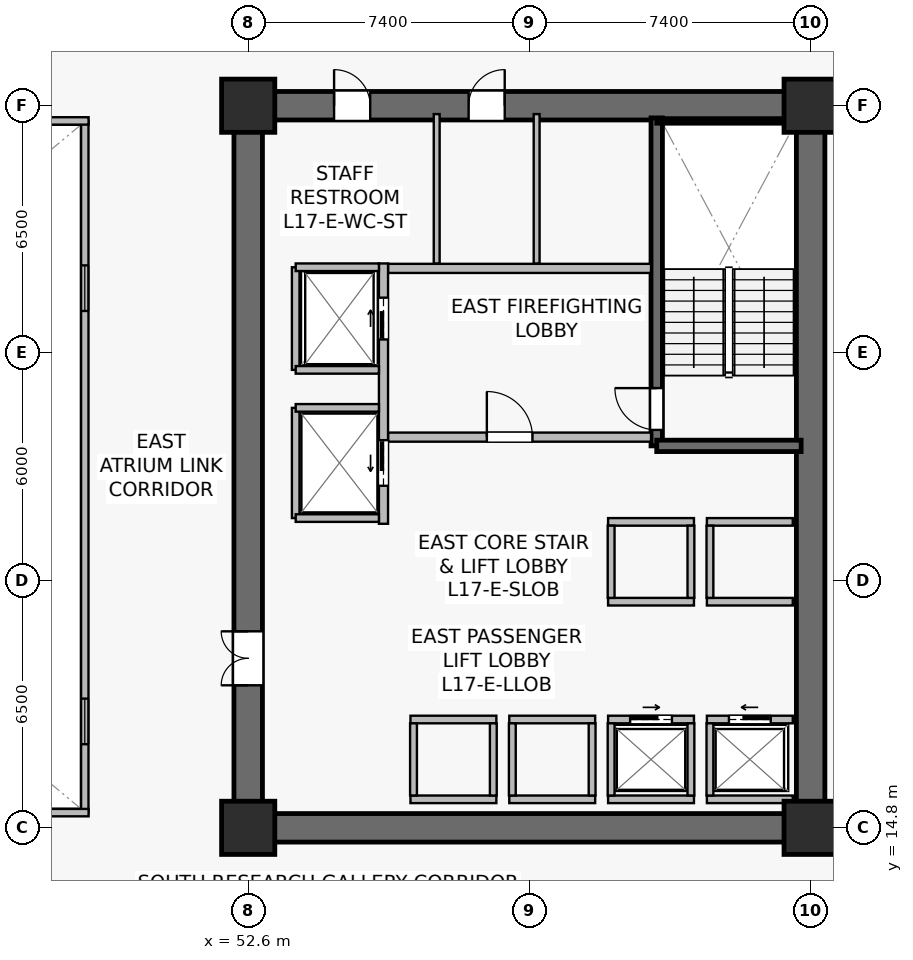
"""IFC4 building model, lengths in metres.
Left out: names, types, materials, properties, quantities, classifications, styles, units other than length and angle.
Written with IfcOpenShell. Run it as: python <this file> out.ifc"""

import sys

from ifc_helpers import new_model, si_unit, direction, frame, frame_2d, origin, origin_2d, place, context, subcontext, project, spatial, rectangle, extrude, source, transform, mapped, element, fill, save


model = new_model("IFC4")
c1 = context("Model", 3, precision=1e-05, world=origin(), true_north=direction((0.0, 1.0)))
c2 = subcontext(c1, "Body", "Model", "MODEL_VIEW")
j1 = project(units=[si_unit("LENGTHUNIT", "METRE"), si_unit("PLANEANGLEUNIT", "RADIAN")], contexts=[c1])
p1 = place(None, origin())
s1 = spatial("IfcSite", under=j1, at=p1, CompositionType="ELEMENT")
p2 = place(p1, origin())
s2 = spatial("IfcBuilding", under=s1, at=p2, CompositionType="ELEMENT")
p3 = place(p2, frame((0.0, 0.0, 70.3)))
s3 = spatial("IfcBuildingStorey", under=s2, at=p3, CompositionType="ELEMENT", Elevation=70.3)
p4 = place(p3, frame((52.225, 14.8, 0.0), z_axis=(0.0, 0.0, 1.0), x_axis=(1.0, 0.0, 0.0)))
e1 = element("IfcWall", 1, at=p4, inside=s3, PredefinedType="SHEAR", context=c2, shape_type="SweptSolid", body=[
    extrude(rectangle(XDim=15.55, YDim=0.75, at=frame_2d((7.775, 0.0))), origin(), (0.0, 0.0, 1.0), 3.78),
])
p5 = place(p3, frame((52.225, 33.8, 0.0), z_axis=(0.0, 0.0, 1.0), x_axis=(1.0, 0.0, 0.0)))
e2 = element("IfcWall", 2, at=p5, inside=s3, PredefinedType="SHEAR", context=c2, shape_type="SweptSolid", body=[
    extrude(rectangle(XDim=15.55, YDim=0.75, at=frame_2d((7.775, 0.0))), origin(), (0.0, 0.0, 1.0), 3.78),
])
p6 = place(p5, frame((6.175, 0.0, 0.0)))
e3 = element("IfcOpeningElement", 3, at=p6, cuts=e2, PredefinedType="OPENING", context=c2, shape_type="SweptSolid", body=[
    extrude(rectangle(XDim=0.95, YDim=2.15, at=frame_2d((0.475, 1.075))), frame((0.0, 0.385, 0.0), z_axis=(0.0, -1.0, 0.0), x_axis=(1.0, 0.0, 0.0)), (0.0, 0.0, 1.0), 0.77),
])
p7 = place(p5, frame((2.635, 0.0, 0.0)))
e4 = element("IfcOpeningElement", 4, at=p7, cuts=e2, PredefinedType="OPENING", context=c2, shape_type="SweptSolid", body=[
    extrude(rectangle(XDim=0.95, YDim=2.15, at=frame_2d((0.475, 1.075))), frame((0.0, 0.385, 0.0), z_axis=(0.0, -1.0, 0.0), x_axis=(1.0, 0.0, 0.0)), (0.0, 0.0, 1.0), 0.77),
])
p8 = place(p3, frame((52.6, 15.175, 0.0), z_axis=(0.0, 0.0, 1.0), x_axis=(0.0, 1.0, 0.0)))
e5 = element("IfcWall", 5, at=p8, inside=s3, PredefinedType="SHEAR", context=c2, shape_type="SweptSolid", body=[
    extrude(rectangle(XDim=18.25, YDim=0.75, at=frame_2d((9.125, 0.0))), origin(), (0.0, 0.0, 1.0), 3.78),
])
p9 = place(p8, frame((3.375, 0.0, 0.0)))
e6 = element("IfcOpeningElement", 6, at=p9, cuts=e5, PredefinedType="OPENING", context=c2, shape_type="SweptSolid", body=[
    extrude(rectangle(XDim=1.42, YDim=2.2, at=frame_2d((0.71, 1.1))), frame((0.0, 0.385, 0.0), z_axis=(0.0, -1.0, 0.0), x_axis=(1.0, 0.0, 0.0)), (0.0, 0.0, 1.0), 0.77),
])
p10 = place(p3, frame((67.4, 15.175, 0.0), z_axis=(0.0, 0.0, 1.0), x_axis=(0.0, 1.0, 0.0)))
e7 = element("IfcWall", 7, at=p10, inside=s3, PredefinedType="SHEAR", context=c2, shape_type="SweptSolid", body=[
    extrude(rectangle(XDim=18.25, YDim=0.75, at=frame_2d((9.125, 0.0))), origin(), (0.0, 0.0, 1.0), 3.78),
])
p11 = place(p3, frame((63.35, 24.85, 0.0), z_axis=(0.0, 0.0, 1.0), x_axis=(0.0, 1.0, 0.0)))
e8 = element("IfcWall", 8, at=p11, inside=s3, PredefinedType="SHEAR", context=c2, shape_type="SweptSolid", body=[
    extrude(rectangle(XDim=8.63, YDim=0.3, at=frame_2d((4.315, 0.0))), origin(), (0.0, 0.0, 1.0), 3.78),
])
p12 = place(p11, frame((0.42, 0.0, 0.0)))
e9 = element("IfcOpeningElement", 9, at=p12, cuts=e8, PredefinedType="OPENING", context=c2, shape_type="SweptSolid", body=[
    extrude(rectangle(XDim=1.1, YDim=2.15, at=frame_2d((0.55, 1.075))), frame((0.0, 0.16, 0.0), z_axis=(0.0, -1.0, 0.0), x_axis=(1.0, 0.0, 0.0)), (0.0, 0.0, 1.0), 0.32),
])
p13 = place(p3, frame((63.35, 24.85, 0.0), z_axis=(0.0, 0.0, 1.0), x_axis=(1.0, 0.0, 0.0)))
e10 = element("IfcWall", 10, at=p13, inside=s3, PredefinedType="SHEAR", context=c2, shape_type="SweptSolid", body=[
    extrude(rectangle(XDim=3.8, YDim=0.3, at=frame_2d((1.9, 0.0))), origin(), (0.0, 0.0, 1.0), 3.78),
])
p14 = place(p3, frame((63.35, 33.4, 0.0), z_axis=(0.0, 0.0, 1.0), x_axis=(1.0, 0.0, 0.0)))
e11 = element("IfcWall", 11, at=p14, inside=s3, PredefinedType="SOLIDWALL", context=c2, shape_type="SweptSolid", body=[
    extrude(rectangle(XDim=3.72, YDim=0.12, at=frame_2d((1.86, 0.0))), origin(), (0.0, 0.0, 1.0), 3.78),
])
m1 = source(origin(), c2, "Body", "SweptSolid", [
    extrude(rectangle(XDim=1.4, YDim=1.4, at=origin_2d()), origin(), (0.0, 0.0, 1.0), 4.1),
])
for number, where, z_axis, x_axis in (
    (12, (52.6, 14.8, 0.0), (0.0, 0.0, 1.0), (1.0, 0.0, 0.0)),
    (13, (67.4, 14.8, 0.0), (0.0, 0.0, 1.0), (1.0, 0.0, 0.0)),
    (14, (52.6, 33.8, 0.0), (0.0, 0.0, 1.0), (1.0, 0.0, 0.0)),
    (15, (67.4, 33.8, 0.0), (0.0, 0.0, 1.0), (1.0, 0.0, 0.0)),
):
    element("IfcColumn", number, at=place(p3, frame(where, z_axis=z_axis, x_axis=x_axis)), inside=s3, PredefinedType="COLUMN", context=c2, shape_type="MappedRepresentation", body=[
        mapped(m1, transform((0.0, 0.0, 0.0), scale=1.0)),
    ])
p15 = place(p3, frame((56.28, 25.08, 0.0), z_axis=(0.0, 0.0, 1.0), x_axis=(1.0, 0.0, 0.0)))
e16 = element("IfcWall", 16, at=p15, inside=s3, PredefinedType="SOLIDWALL", context=c2, shape_type="SweptSolid", body=[
    extrude(rectangle(XDim=6.92, YDim=0.24, at=frame_2d((3.46, 0.0))), origin(), (0.0, 0.0, 1.0), 3.115),
])
p16 = place(p15, frame((2.6, 0.0, 0.0)))
e17 = element("IfcOpeningElement", 17, at=p16, cuts=e16, PredefinedType="OPENING", context=c2, shape_type="SweptSolid", body=[
    extrude(rectangle(XDim=1.2, YDim=2.16, at=frame_2d((0.6, 1.08))), frame((0.0, 0.13, 0.0), z_axis=(0.0, -1.0, 0.0), x_axis=(1.0, 0.0, 0.0)), (0.0, 0.0, 1.0), 0.26),
])
p17 = place(p3, frame((56.28, 29.52, 0.0), z_axis=(0.0, 0.0, 1.0), x_axis=(1.0, 0.0, 0.0)))
e18 = element("IfcWall", 18, at=p17, inside=s3, PredefinedType="SOLIDWALL", context=c2, shape_type="SweptSolid", body=[
    extrude(rectangle(XDim=6.92, YDim=0.24, at=frame_2d((3.46, 0.0))), origin(), (0.0, 0.0, 1.0), 3.115),
])
p18 = place(p3, frame((56.16, 22.8, 0.0), z_axis=(0.0, 0.0, 1.0), x_axis=(0.0, 1.0, 0.0)))
e19 = element("IfcWall", 19, at=p18, inside=s3, PredefinedType="SOLIDWALL", context=c2, shape_type="SweptSolid", body=[
    extrude(rectangle(XDim=6.85, YDim=0.24, at=frame_2d((3.425, 0.0))), origin(), (0.0, 0.0, 1.0), 2.865),
])
p19 = place(p18, frame((4.85, 0.0, 0.0)))
e20 = element("IfcOpeningElement", 20, at=p19, cuts=e19, PredefinedType="OPENING", context=c2, shape_type="SweptSolid", body=[
    extrude(rectangle(XDim=1.1, YDim=2.22, at=frame_2d((0.55, 1.11))), frame((0.0, 0.13, 0.0), z_axis=(0.0, -1.0, 0.0), x_axis=(1.0, 0.0, 0.0)), (0.0, 0.0, 1.0), 0.26),
])
p20 = place(p18, frame((1.0, 0.0, 0.0)))
e21 = element("IfcOpeningElement", 21, at=p20, cuts=e19, PredefinedType="OPENING", context=c2, shape_type="SweptSolid", body=[
    extrude(rectangle(XDim=1.2, YDim=2.22, at=frame_2d((0.6, 1.11))), frame((0.0, 0.13, 0.0), z_axis=(0.0, -1.0, 0.0), x_axis=(1.0, 0.0, 0.0)), (0.0, 0.0, 1.0), 0.26),
])
p21 = place(p3, frame((64.67, 17.65, 0.0), z_axis=(0.0, 0.0, 1.0), x_axis=(1.0, 0.0, 0.0)))
e22 = element("IfcWall", 22, at=p21, inside=s3, PredefinedType="SOLIDWALL", context=c2, shape_type="SweptSolid", body=[
    extrude(rectangle(XDim=2.26, YDim=0.2, at=frame_2d((1.13, 0.0))), origin(), (0.0, 0.0, 1.0), 3.78),
])
p22 = place(p21, frame((0.58, 0.0, 0.0)))
e23 = element("IfcOpeningElement", 23, at=p22, cuts=e22, PredefinedType="OPENING", context=c2, shape_type="SweptSolid", body=[
    extrude(rectangle(XDim=1.1, YDim=2.22, at=frame_2d((0.55, 1.11))), frame((0.0, 0.11, 0.0), z_axis=(0.0, -1.0, 0.0), x_axis=(1.0, 0.0, 0.0)), (0.0, 0.0, 1.0), 0.22),
])
p23 = place(p3, frame((64.67, 15.55, 0.0), z_axis=(0.0, 0.0, 1.0), x_axis=(1.0, 0.0, 0.0)))
e24 = element("IfcWall", 24, at=p23, inside=s3, PredefinedType="SOLIDWALL", context=c2, shape_type="SweptSolid", body=[
    extrude(rectangle(XDim=2.26, YDim=0.2, at=frame_2d((1.13, 0.0))), origin(), (0.0, 0.0, 1.0), 3.78),
])
p24 = place(p3, frame((64.75, 15.65, 0.0), z_axis=(0.0, 0.0, 1.0), x_axis=(0.0, 1.0, 0.0)))
e25 = element("IfcWall", 25, at=p24, inside=s3, PredefinedType="SOLIDWALL", context=c2, shape_type="SweptSolid", body=[
    extrude(rectangle(XDim=1.9, YDim=0.18, at=frame_2d((0.95, 0.0))), origin(), (0.0, 0.0, 1.0), 3.78),
])
p25 = place(p3, frame((62.07, 17.65, 0.0), z_axis=(0.0, 0.0, 1.0), x_axis=(1.0, 0.0, 0.0)))
e26 = element("IfcWall", 26, at=p25, inside=s3, PredefinedType="SOLIDWALL", context=c2, shape_type="SweptSolid", body=[
    extrude(rectangle(XDim=2.26, YDim=0.2, at=frame_2d((1.13, 0.0))), origin(), (0.0, 0.0, 1.0), 3.78),
])
p26 = place(p25, frame((0.58, 0.0, 0.0)))
e27 = element("IfcOpeningElement", 27, at=p26, cuts=e26, PredefinedType="OPENING", context=c2, shape_type="SweptSolid", body=[
    extrude(rectangle(XDim=1.1, YDim=2.22, at=frame_2d((0.55, 1.11))), frame((0.0, 0.11, 0.0), z_axis=(0.0, -1.0, 0.0), x_axis=(1.0, 0.0, 0.0)), (0.0, 0.0, 1.0), 0.22),
])
p27 = place(p3, frame((62.07, 15.55, 0.0), z_axis=(0.0, 0.0, 1.0), x_axis=(1.0, 0.0, 0.0)))
e28 = element("IfcWall", 28, at=p27, inside=s3, PredefinedType="SOLIDWALL", context=c2, shape_type="SweptSolid", body=[
    extrude(rectangle(XDim=2.26, YDim=0.2, at=frame_2d((1.13, 0.0))), origin(), (0.0, 0.0, 1.0), 3.78),
])
for number, where, z_axis, x_axis in (
    (29, (62.15, 15.65, 0.0), (0.0, 0.0, 1.0), (0.0, 1.0, 0.0)),
    (30, (64.25, 15.65, 0.0), (0.0, 0.0, 1.0), (0.0, 1.0, 0.0)),
):
    element("IfcWall", number, at=place(p3, frame(where, z_axis=z_axis, x_axis=x_axis)), inside=s3, PredefinedType="SOLIDWALL", context=c2, shape_type="SweptSolid", body=[
        extrude(rectangle(XDim=1.9, YDim=0.18, at=frame_2d((0.95, 0.0))), origin(), (0.0, 0.0, 1.0), 3.78),
    ])
for number, where, z_axis, x_axis in (
    (31, (59.47, 17.65, 0.0), (0.0, 0.0, 1.0), (1.0, 0.0, 0.0)),
    (32, (59.47, 15.55, 0.0), (0.0, 0.0, 1.0), (1.0, 0.0, 0.0)),
):
    element("IfcWall", number, at=place(p3, frame(where, z_axis=z_axis, x_axis=x_axis)), inside=s3, PredefinedType="SOLIDWALL", context=c2, shape_type="SweptSolid", body=[
        extrude(rectangle(XDim=2.26, YDim=0.2, at=frame_2d((1.13, 0.0))), origin(), (0.0, 0.0, 1.0), 3.115),
    ])
for number, where, z_axis, x_axis in (
    (33, (59.55, 15.65, 0.0), (0.0, 0.0, 1.0), (0.0, 1.0, 0.0)),
    (34, (61.65, 15.65, 0.0), (0.0, 0.0, 1.0), (0.0, 1.0, 0.0)),
):
    element("IfcWall", number, at=place(p3, frame(where, z_axis=z_axis, x_axis=x_axis)), inside=s3, PredefinedType="SOLIDWALL", context=c2, shape_type="SweptSolid", body=[
        extrude(rectangle(XDim=1.9, YDim=0.18, at=frame_2d((0.95, 0.0))), origin(), (0.0, 0.0, 1.0), 3.78),
    ])
for number, where, z_axis, x_axis in (
    (35, (56.87, 17.65, 0.0), (0.0, 0.0, 1.0), (1.0, 0.0, 0.0)),
    (36, (56.87, 15.55, 0.0), (0.0, 0.0, 1.0), (1.0, 0.0, 0.0)),
):
    element("IfcWall", number, at=place(p3, frame(where, z_axis=z_axis, x_axis=x_axis)), inside=s3, PredefinedType="SOLIDWALL", context=c2, shape_type="SweptSolid", body=[
        extrude(rectangle(XDim=2.26, YDim=0.2, at=frame_2d((1.13, 0.0))), origin(), (0.0, 0.0, 1.0), 3.78),
    ])
for number, where, z_axis, x_axis in (
    (37, (56.95, 15.65, 0.0), (0.0, 0.0, 1.0), (0.0, 1.0, 0.0)),
    (38, (59.05, 15.65, 0.0), (0.0, 0.0, 1.0), (0.0, 1.0, 0.0)),
):
    element("IfcWall", number, at=place(p3, frame(where, z_axis=z_axis, x_axis=x_axis)), inside=s3, PredefinedType="SOLIDWALL", context=c2, shape_type="SweptSolid", body=[
        extrude(rectangle(XDim=1.9, YDim=0.18, at=frame_2d((0.95, 0.0))), origin(), (0.0, 0.0, 1.0), 3.78),
    ])
for number, where, z_axis, x_axis in (
    (39, (64.67, 20.75, 0.0), (0.0, 0.0, 1.0), (1.0, 0.0, 0.0)),
    (40, (64.67, 22.85, 0.0), (0.0, 0.0, 1.0), (1.0, 0.0, 0.0)),
):
    element("IfcWall", number, at=place(p3, frame(where, z_axis=z_axis, x_axis=x_axis)), inside=s3, PredefinedType="SOLIDWALL", context=c2, shape_type="SweptSolid", body=[
        extrude(rectangle(XDim=2.26, YDim=0.2, at=frame_2d((1.13, 0.0))), origin(), (0.0, 0.0, 1.0), 3.78),
    ])
p28 = place(p3, frame((64.75, 20.85, 0.0), z_axis=(0.0, 0.0, 1.0), x_axis=(0.0, 1.0, 0.0)))
e41 = element("IfcWall", 41, at=p28, inside=s3, PredefinedType="SOLIDWALL", context=c2, shape_type="SweptSolid", body=[
    extrude(rectangle(XDim=1.9, YDim=0.18, at=frame_2d((0.95, 0.0))), origin(), (0.0, 0.0, 1.0), 3.78),
])
for number, where, z_axis, x_axis in (
    (42, (62.07, 20.75, 0.0), (0.0, 0.0, 1.0), (1.0, 0.0, 0.0)),
    (43, (62.07, 22.85, 0.0), (0.0, 0.0, 1.0), (1.0, 0.0, 0.0)),
):
    element("IfcWall", number, at=place(p3, frame(where, z_axis=z_axis, x_axis=x_axis)), inside=s3, PredefinedType="SOLIDWALL", context=c2, shape_type="SweptSolid", body=[
        extrude(rectangle(XDim=2.26, YDim=0.2, at=frame_2d((1.13, 0.0))), origin(), (0.0, 0.0, 1.0), 3.78),
    ])
for number, where, z_axis, x_axis in (
    (44, (62.15, 20.85, 0.0), (0.0, 0.0, 1.0), (0.0, 1.0, 0.0)),
    (45, (64.25, 20.85, 0.0), (0.0, 0.0, 1.0), (0.0, 1.0, 0.0)),
):
    element("IfcWall", number, at=place(p3, frame(where, z_axis=z_axis, x_axis=x_axis)), inside=s3, PredefinedType="SOLIDWALL", context=c2, shape_type="SweptSolid", body=[
        extrude(rectangle(XDim=1.9, YDim=0.18, at=frame_2d((0.95, 0.0))), origin(), (0.0, 0.0, 1.0), 3.78),
    ])
p29 = place(p3, frame((53.85, 26.85, 0.0), z_axis=(0.0, 0.0, 1.0), x_axis=(0.0, 1.0, 0.0)))
e46 = element("IfcWall", 46, at=p29, inside=s3, PredefinedType="SOLIDWALL", context=c2, shape_type="SweptSolid", body=[
    extrude(rectangle(XDim=2.7, YDim=0.2, at=frame_2d((1.35, 0.0))), origin(), (0.0, 0.0, 1.0), 3.78),
])
p30 = place(p3, frame((53.85, 29.55, 0.0), z_axis=(0.0, 0.0, 1.0), x_axis=(1.0, 0.0, 0.0)))
e47 = element("IfcWall", 47, at=p30, inside=s3, PredefinedType="SOLIDWALL", context=c2, shape_type="SweptSolid", body=[
    extrude(rectangle(XDim=2.19, YDim=0.2, at=frame_2d((1.095, 0.0))), origin(), (0.0, 0.0, 1.0), 3.78),
])
p31 = place(p3, frame((53.85, 26.85, 0.0), z_axis=(0.0, 0.0, 1.0), x_axis=(1.0, 0.0, 0.0)))
e48 = element("IfcWall", 48, at=p31, inside=s3, PredefinedType="SOLIDWALL", context=c2, shape_type="SweptSolid", body=[
    extrude(rectangle(XDim=2.19, YDim=0.2, at=frame_2d((1.095, 0.0))), origin(), (0.0, 0.0, 1.0), 3.177),
])
p32 = place(p3, frame((53.85, 22.95, 0.0), z_axis=(0.0, 0.0, 1.0), x_axis=(0.0, 1.0, 0.0)))
e49 = element("IfcWall", 49, at=p32, inside=s3, PredefinedType="SOLIDWALL", context=c2, shape_type="SweptSolid", body=[
    extrude(rectangle(XDim=2.9, YDim=0.2, at=frame_2d((1.45, 0.0))), origin(), (0.0, 0.0, 1.0), 2.865),
])
for number, where, z_axis, x_axis in (
    (50, (53.85, 25.85, 0.0), (0.0, 0.0, 1.0), (1.0, 0.0, 0.0)),
    (51, (53.85, 22.95, 0.0), (0.0, 0.0, 1.0), (1.0, 0.0, 0.0)),
):
    element("IfcWall", number, at=place(p3, frame(where, z_axis=z_axis, x_axis=x_axis)), inside=s3, PredefinedType="SOLIDWALL", context=c2, shape_type="SweptSolid", body=[
        extrude(rectangle(XDim=2.19, YDim=0.2, at=frame_2d((1.095, 0.0))), origin(), (0.0, 0.0, 1.0), 3.78),
    ])
p33 = place(p3, frame((60.19, 29.65, 0.0), z_axis=(0.0, 0.0, 1.0), x_axis=(0.0, 1.0, 0.0)))
e52 = element("IfcWall", 52, at=p33, inside=s3, PredefinedType="PLUMBINGWALL", context=c2, shape_type="SweptSolid", body=[
    extrude(rectangle(XDim=3.93, YDim=0.155, at=frame_2d((1.965, 0.0))), origin(), (0.0, 0.0, 1.0), 3.115),
])
p34 = place(p3, frame((57.56, 29.65, 0.0), z_axis=(0.0, 0.0, 1.0), x_axis=(0.0, 1.0, 0.0)))
e53 = element("IfcWall", 53, at=p34, inside=s3, PredefinedType="PLUMBINGWALL", context=c2, shape_type="SweptSolid", body=[
    extrude(rectangle(XDim=3.93, YDim=0.155, at=frame_2d((1.965, 0.0))), origin(), (0.0, 0.0, 1.0), 3.78),
])
p35 = place(p3, frame((48.3, 15.2, 0.0), z_axis=(0.0, 0.0, 1.0), x_axis=(0.0, 1.0, 0.0)))
e54 = element("IfcWall", 54, at=p35, inside=s3, PredefinedType="SOLIDWALL", context=c2, shape_type="SweptSolid", body=[
    extrude(rectangle(XDim=18.2, YDim=0.195, at=frame_2d((9.1, 0.0))), origin(), (0.0, 0.0, 1.0), 3.78),
])
p36 = place(p35, frame((1.8, 0.0, 0.9)))
e55 = element("IfcOpeningElement", 55, at=p36, cuts=e54, PredefinedType="OPENING", context=c2, shape_type="SweptSolid", body=[
    extrude(rectangle(XDim=1.2, YDim=1.35, at=frame_2d((0.6, 0.675))), frame((0.0, 0.107, 0.0), z_axis=(0.0, -1.0, 0.0), x_axis=(1.0, 0.0, 0.0)), (0.0, 0.0, 1.0), 0.215),
])
p37 = place(p35, frame((13.2, 0.0, 0.9)))
e56 = element("IfcOpeningElement", 56, at=p37, cuts=e54, PredefinedType="OPENING", context=c2, shape_type="SweptSolid", body=[
    extrude(rectangle(XDim=1.2, YDim=1.35, at=frame_2d((0.6, 0.675))), frame((0.0, 0.107, 0.0), z_axis=(0.0, -1.0, 0.0), x_axis=(1.0, 0.0, 0.0)), (0.0, 0.0, 1.0), 0.215),
])
for number, where, z_axis, x_axis in (
    (57, (26.4, 15.2, 0.0), (0.0, 0.0, 1.0), (1.0, 0.0, 0.0)),
    (58, (26.4, 33.4, 0.0), (0.0, 0.0, 1.0), (1.0, 0.0, 0.0)),
):
    element("IfcWall", number, at=place(p3, frame(where, z_axis=z_axis, x_axis=x_axis)), inside=s3, PredefinedType="SOLIDWALL", context=c2, shape_type="SweptSolid", body=[
        extrude(rectangle(XDim=22.0, YDim=0.195, at=frame_2d((11.0, 0.0))), origin(), (0.0, 0.0, 1.0), 3.78),
    ])
m2 = source(origin(), c2, "Body", "SweptSolid", [
    extrude(rectangle(XDim=1.2, YDim=1.35, at=frame_2d((0.6, 0.675))), frame((0.0, 0.03, 0.0), z_axis=(0.0, -1.0, 0.0), x_axis=(1.0, 0.0, 0.0)), (0.0, 0.0, 1.0), 0.06),
])
p38 = place(p36, origin())
e59 = element("IfcWindow", 59, at=p38, inside=s3, PartitioningType="SINGLE_PANEL", PredefinedType="WINDOW", context=c2, shape_type="MappedRepresentation", body=[
    mapped(m2, transform((0.0, 0.0, 0.0), scale=1.0)),
])
fill(e55, e59)
p39 = place(p37, origin())
e60 = element("IfcWindow", 60, at=p39, inside=s3, PartitioningType="SINGLE_PANEL", PredefinedType="WINDOW", context=c2, shape_type="MappedRepresentation", body=[
    mapped(m2, transform((0.0, 0.0, 0.0), scale=1.0)),
])
fill(e56, e60)
m3 = source(origin(), c2, "Body", "SweptSolid", [
    extrude(rectangle(XDim=1.1, YDim=2.15, at=frame_2d((0.55, 1.075))), frame((0.0, 0.025, 0.0), z_axis=(0.0, -1.0, 0.0), x_axis=(1.0, 0.0, 0.0)), (0.0, 0.0, 1.0), 0.05),
])
p40 = place(p12, origin())
e61 = element("IfcDoor", 61, at=p40, inside=s3, OperationType="SINGLE_SWING_RIGHT", PredefinedType="DOOR", context=c2, shape_type="MappedRepresentation", body=[
    mapped(m3, transform((0.0, 0.0, 0.0), scale=1.0)),
])
fill(e9, e61)
m4 = source(origin(), c2, "Body", "SweptSolid", [
    extrude(rectangle(XDim=1.2, YDim=2.16, at=frame_2d((0.6, 1.08))), frame((0.0, 0.025, 0.0), z_axis=(0.0, -1.0, 0.0), x_axis=(1.0, 0.0, 0.0)), (0.0, 0.0, 1.0), 0.05),
])
p41 = place(p16, origin())
e62 = element("IfcDoor", 62, at=p41, inside=s3, OperationType="SINGLE_SWING_LEFT", PredefinedType="DOOR", context=c2, shape_type="MappedRepresentation", body=[
    mapped(m4, transform((0.0, 0.0, 0.0), scale=1.0)),
])
fill(e17, e62)
m5 = source(origin(), c2, "Body", "SweptSolid", [
    extrude(rectangle(XDim=1.1, YDim=2.22, at=frame_2d((0.55, 1.11))), frame((0.0, 0.025, 0.0), z_axis=(0.0, -1.0, 0.0), x_axis=(1.0, 0.0, 0.0)), (0.0, 0.0, 1.0), 0.05),
])
p42 = place(p22, origin())
e63 = element("IfcDoor", 63, at=p42, inside=s3, OperationType="SLIDING_TO_LEFT", PredefinedType="USERDEFINED", context=c2, shape_type="MappedRepresentation", body=[
    mapped(m5, transform((0.0, 0.0, 0.0), scale=1.0)),
])
fill(e23, e63)
p43 = place(p26, origin())
e64 = element("IfcDoor", 64, at=p43, inside=s3, OperationType="SLIDING_TO_RIGHT", PredefinedType="USERDEFINED", context=c2, shape_type="MappedRepresentation", body=[
    mapped(m5, transform((0.0, 0.0, 0.0), scale=1.0)),
])
fill(e27, e64)
p44 = place(p19, origin())
e65 = element("IfcDoor", 65, at=p44, inside=s3, OperationType="SLIDING_TO_RIGHT", PredefinedType="USERDEFINED", context=c2, shape_type="MappedRepresentation", body=[
    mapped(m5, transform((0.0, 0.0, 0.0), scale=1.0)),
])
fill(e20, e65)
m6 = source(origin(), c2, "Body", "SweptSolid", [
    extrude(rectangle(XDim=1.2, YDim=2.22, at=frame_2d((0.6, 1.11))), frame((0.0, 0.025, 0.0), z_axis=(0.0, -1.0, 0.0), x_axis=(1.0, 0.0, 0.0)), (0.0, 0.0, 1.0), 0.05),
])
p45 = place(p20, origin())
e66 = element("IfcDoor", 66, at=p45, inside=s3, OperationType="SLIDING_TO_LEFT", PredefinedType="USERDEFINED", context=c2, shape_type="MappedRepresentation", body=[
    mapped(m6, transform((0.0, 0.0, 0.0), scale=1.0)),
])
fill(e21, e66)
m7 = source(origin(), c2, "Body", "SweptSolid", [
    extrude(rectangle(XDim=1.42, YDim=2.2, at=frame_2d((0.71, 1.1))), frame((0.0, 0.025, 0.0), z_axis=(0.0, -1.0, 0.0), x_axis=(1.0, 0.0, 0.0)), (0.0, 0.0, 1.0), 0.05),
])
p46 = place(p9, origin())
e67 = element("IfcDoor", 67, at=p46, inside=s3, OperationType="DOUBLE_DOOR_SINGLE_SWING", PredefinedType="DOOR", context=c2, shape_type="MappedRepresentation", body=[
    mapped(m7, transform((0.0, 0.0, 0.0), scale=1.0)),
])
fill(e6, e67)
m8 = source(origin(), c2, "Body", "SweptSolid", [
    extrude(rectangle(XDim=0.95, YDim=2.15, at=frame_2d((0.475, 1.075))), frame((0.0, 0.025, 0.0), z_axis=(0.0, -1.0, 0.0), x_axis=(1.0, 0.0, 0.0)), (0.0, 0.0, 1.0), 0.05),
])
p47 = place(p6, origin())
e68 = element("IfcDoor", 68, at=p47, inside=s3, OperationType="SINGLE_SWING_RIGHT", PredefinedType="DOOR", context=c2, shape_type="MappedRepresentation", body=[
    mapped(m8, transform((0.0, 0.0, 0.0), scale=1.0)),
])
fill(e3, e68)
p48 = place(p7, origin())
e69 = element("IfcDoor", 69, at=p48, inside=s3, OperationType="SINGLE_SWING_LEFT", PredefinedType="DOOR", context=c2, shape_type="MappedRepresentation", body=[
    mapped(m8, transform((0.0, 0.0, 0.0), scale=1.0)),
])
fill(e4, e69)
save(model, sys.argv[1])
